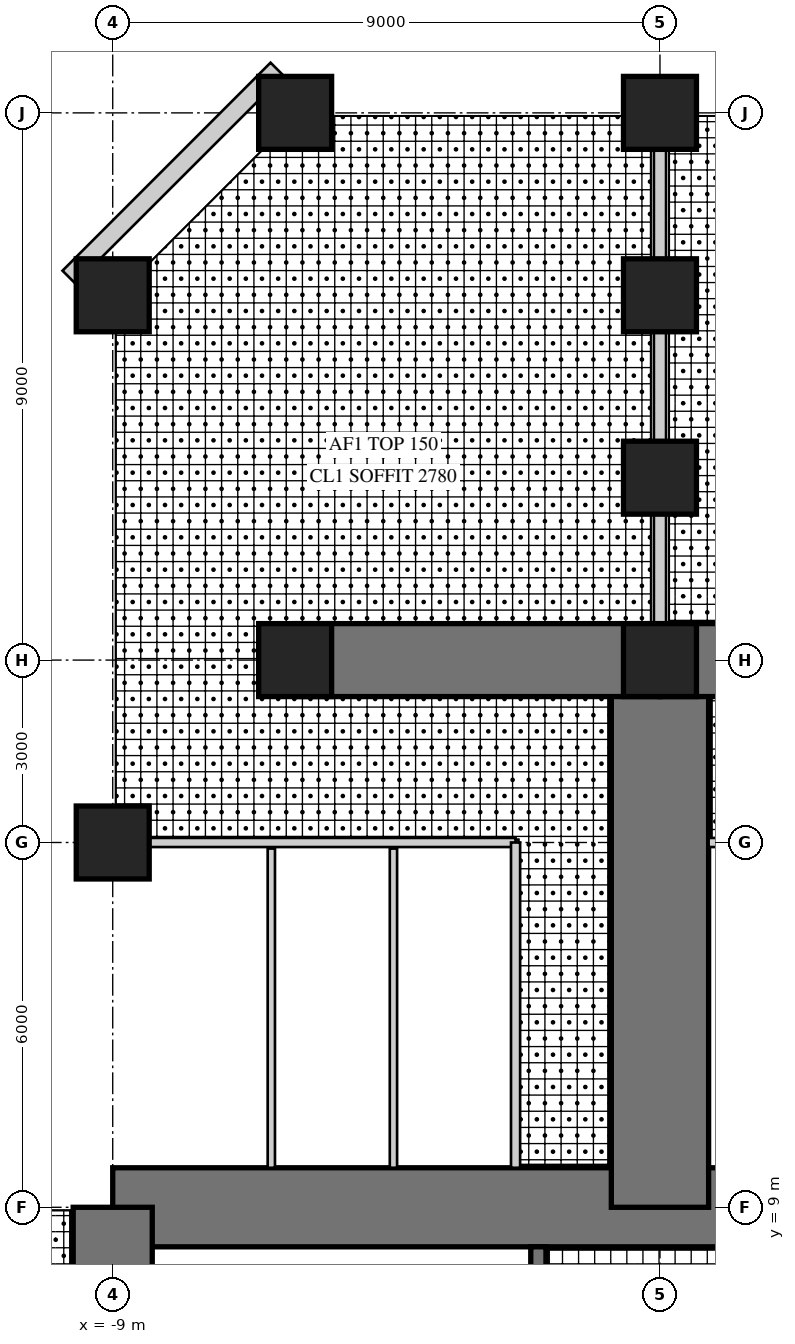
"""IFC4 building model, lengths in metres.
Left out: names, types, materials, properties, quantities, classifications, styles, units other than length and angle.
Written with IfcOpenShell. Run it as: python <this file> out.ifc"""

import sys

from ifc_helpers import new_model, si_unit, direction, frame, frame_2d, origin, origin_2d, place, context, subcontext, project, spatial, rectangle, hollow_rectangle, extrude, element, fill, save


model = new_model("IFC4")
c1 = context("Model", 3, precision=1e-05, world=origin(), true_north=direction((0.0, 1.0)))
c2 = subcontext(c1, "Body", "Model", "MODEL_VIEW")
j1 = project(units=[si_unit("LENGTHUNIT", "METRE"), si_unit("PLANEANGLEUNIT", "RADIAN")], contexts=[c1])
p1 = place(None, origin())
s1 = spatial("IfcSite", under=j1, at=p1, CompositionType="ELEMENT")
p2 = place(p1, origin())
s2 = spatial("IfcBuilding", under=s1, at=p2, CompositionType="ELEMENT")
p3 = place(p2, frame((0.0, 0.0, 71.5)))
s3 = spatial("IfcBuildingStorey", under=s2, at=p3, CompositionType="ELEMENT", Elevation=71.5)
p4 = place(p3, frame((9.0, 9.0, 0.0), z_axis=(0.0, 0.0, 1.0), x_axis=(-1.0, 0.0, 0.0)))
e1 = element("IfcWall", 1, at=p4, inside=s3, PredefinedType="SHEAR", context=c2, shape_type="SweptSolid", body=[
    extrude(rectangle(XDim=18.0, YDim=1.3, at=frame_2d((9.0, 0.0))), origin(), (0.0, 0.0, 1.0), 4.0),
])
p5 = place(p4, frame((9.8, 0.0, 0.0)))
e2 = element("IfcOpeningElement", 2, at=p5, cuts=e1, PredefinedType="OPENING", context=c2, shape_type="SweptSolid", body=[
    extrude(rectangle(XDim=1.0, YDim=2.4, at=frame_2d((0.5, 1.2))), frame((0.0, 0.66, 0.0), z_axis=(0.0, -1.0, 0.0), x_axis=(1.0, 0.0, 0.0)), (0.0, 0.0, 1.0), 1.32),
])
p6 = place(p3, frame((-9.0, 9.0, 0.0), z_axis=(0.0, 0.0, 1.0), x_axis=(0.0, -1.0, 0.0)))
e3 = element("IfcWall", 3, at=p6, inside=s3, PredefinedType="SHEAR", context=c2, shape_type="SweptSolid", body=[
    extrude(rectangle(XDim=18.0, YDim=1.3, at=frame_2d((9.0, 0.0))), origin(), (0.0, 0.0, 1.0), 4.0),
])
p7 = place(p6, frame((9.8, 0.0, 0.0)))
e4 = element("IfcOpeningElement", 4, at=p7, cuts=e3, PredefinedType="OPENING", context=c2, shape_type="SweptSolid", body=[
    extrude(rectangle(XDim=1.0, YDim=2.4, at=frame_2d((0.5, 1.2))), frame((0.0, 0.66, 0.0), z_axis=(0.0, -1.0, 0.0), x_axis=(1.0, 0.0, 0.0)), (0.0, 0.0, 1.0), 1.32),
])
p8 = place(p3, frame((-2.0, 1.675, 0.0), z_axis=(0.0, 0.0, 1.0), x_axis=(0.0, 1.0, 0.0)))
e5 = element("IfcWall", 5, at=p8, inside=s3, PredefinedType="SHEAR", context=c2, shape_type="SweptSolid", body=[
    extrude(rectangle(XDim=6.675, YDim=0.25, at=frame_2d((3.337, 0.0))), origin(), (0.0, 0.0, 1.0), 4.0),
])
p9 = place(p8, frame((0.725, 0.0, 0.0)))
e6 = element("IfcOpeningElement", 6, at=p9, cuts=e5, PredefinedType="OPENING", context=c2, shape_type="SweptSolid", body=[
    extrude(rectangle(XDim=1.0, YDim=2.1, at=frame_2d((0.5, 1.05))), frame((0.0, 0.135, 0.0), z_axis=(0.0, -1.0, 0.0), x_axis=(1.0, 0.0, 0.0)), (0.0, 0.0, 1.0), 0.27),
])
p10 = place(p3, frame((0.0, 9.0, 0.0), z_axis=(0.0, 0.0, 1.0), x_axis=(0.0, 1.0, 0.0)))
e7 = element("IfcWall", 7, at=p10, inside=s3, PredefinedType="SHEAR", context=c2, shape_type="SweptSolid", body=[
    extrude(rectangle(XDim=9.0, YDim=1.6, at=frame_2d((4.5, 0.0))), origin(), (0.0, 0.0, 1.0), 4.0),
])
for number, where, z_axis, x_axis in (
    (8, (0.0, 18.0, 0.0), (0.0, 0.0, 1.0), (-1.0, 0.0, 0.0)),
    (9, (0.0, 18.0, 0.0), (0.0, 0.0, 1.0), (1.0, 0.0, 0.0)),
):
    element("IfcWall", number, at=place(p3, frame(where, z_axis=z_axis, x_axis=x_axis)), inside=s3, PredefinedType="SHEAR", context=c2, shape_type="SweptSolid", body=[
        extrude(rectangle(XDim=6.0, YDim=1.2, at=frame_2d((3.0, 0.0))), origin(), (0.0, 0.0, 1.0), 4.0),
    ])
for number, where, z_axis, x_axis in (
    (10, (-9.0, 15.0, 0.0), (0.0, 0.0, 1.0), (1.0, 0.0, 0.0)),
    (11, (-9.0, 24.0, 0.0), (0.0, 0.0, 1.0), (1.0, 0.0, 0.0)),
    (12, (0.0, 27.0, 0.0), (0.0, 0.0, 1.0), (1.0, 0.0, 0.0)),
    (13, (-6.0, 27.0, 0.0), (0.0, 0.0, 1.0), (1.0, 0.0, 0.0)),
    (14, (0.0, 18.0, 0.0), (0.0, 0.0, 1.0), (1.0, 0.0, 0.0)),
    (15, (-6.0, 18.0, 0.0), (0.0, 0.0, 1.0), (1.0, 0.0, 0.0)),
    (16, (0.0, 21.0, 0.0), (0.0, 0.0, 1.0), (1.0, 0.0, 0.0)),
    (17, (0.0, 24.0, 0.0), (0.0, 0.0, 1.0), (1.0, 0.0, 0.0)),
):
    element("IfcColumn", number, at=place(p3, frame(where, z_axis=z_axis, x_axis=x_axis)), inside=s3, PredefinedType="COLUMN", context=c2, shape_type="SweptSolid", body=[
        extrude(rectangle(XDim=1.2, YDim=1.2, at=origin_2d()), origin(), (0.0, 0.0, 1.0), 4.0),
    ])
p11 = place(p3, frame((-6.298, 27.72, 0.0), z_axis=(0.0, 0.0, 1.0), x_axis=(-0.707106781187, -0.707106781187, 0.0)))
e18 = element("IfcWall", 18, at=p11, inside=s3, PredefinedType="SOLIDWALL", context=c2, shape_type="SweptSolid", body=[
    extrude(rectangle(XDim=4.839, YDim=0.3, at=frame_2d((2.419, 0.0))), origin(), (0.0, 0.0, 1.0), 3.8),
])
p12 = place(p11, frame((1.969, 0.0, 0.3)))
e19 = element("IfcOpeningElement", 19, at=p12, cuts=e18, PredefinedType="OPENING", context=c2, shape_type="SweptSolid", body=[
    extrude(rectangle(XDim=0.9, YDim=2.4, at=frame_2d((0.45, 1.2))), frame((0.0, 0.16, 0.0), z_axis=(0.0, -1.0, 0.0), x_axis=(1.0, 0.0, 0.0)), (0.0, 0.0, 1.0), 0.32),
])
p13 = place(p3, frame((-2.375, 15.0, 0.0), z_axis=(0.0, 0.0, 1.0), x_axis=(-1.0, 0.0, 0.0)))
e20 = element("IfcWall", 20, at=p13, inside=s3, PredefinedType="PARTITIONING", context=c2, shape_type="SweptSolid", body=[
    extrude(rectangle(XDim=6.025, YDim=0.15, at=frame_2d((3.012, 0.0))), origin(), (0.0, 0.0, 1.0), 2.95),
])
p14 = place(p13, frame((0.504, 0.0, 0.0)))
e21 = element("IfcOpeningElement", 21, at=p14, cuts=e20, PredefinedType="OPENING", context=c2, shape_type="SweptSolid", body=[
    extrude(rectangle(XDim=1.0, YDim=2.1, at=frame_2d((0.5, 1.05))), frame((0.0, 0.085, 0.0), z_axis=(0.0, -1.0, 0.0), x_axis=(1.0, 0.0, 0.0)), (0.0, 0.0, 1.0), 0.17),
])
p15 = place(p13, frame((2.512, 0.0, 0.0)))
e22 = element("IfcOpeningElement", 22, at=p15, cuts=e20, PredefinedType="OPENING", context=c2, shape_type="SweptSolid", body=[
    extrude(rectangle(XDim=1.0, YDim=2.1, at=frame_2d((0.5, 1.05))), frame((0.0, 0.085, 0.0), z_axis=(0.0, -1.0, 0.0), x_axis=(1.0, 0.0, 0.0)), (0.0, 0.0, 1.0), 0.17),
])
p16 = place(p13, frame((4.521, 0.0, 0.0)))
e23 = element("IfcOpeningElement", 23, at=p16, cuts=e20, PredefinedType="OPENING", context=c2, shape_type="SweptSolid", body=[
    extrude(rectangle(XDim=1.0, YDim=2.1, at=frame_2d((0.5, 1.05))), frame((0.0, 0.085, 0.0), z_axis=(0.0, -1.0, 0.0), x_axis=(1.0, 0.0, 0.0)), (0.0, 0.0, 1.0), 0.17),
])
p17 = place(p3, frame((-2.375, 9.65, 0.0), z_axis=(0.0, 0.0, 1.0), x_axis=(0.0, 1.0, 0.0)))
e24 = element("IfcWall", 24, at=p17, inside=s3, PredefinedType="PARTITIONING", context=c2, shape_type="SweptSolid", body=[
    extrude(rectangle(XDim=5.35, YDim=0.15, at=frame_2d((2.675, 0.0))), origin(), (0.0, 0.0, 1.0), 3.8),
])
for number, where, z_axis, x_axis in (
    (25, (-4.383, 9.65, 0.0), (0.0, 0.0, 1.0), (0.0, 1.0, 0.0)),
    (26, (-6.392, 9.65, 0.0), (0.0, 0.0, 1.0), (0.0, 1.0, 0.0)),
):
    element("IfcWall", number, at=place(p3, frame(where, z_axis=z_axis, x_axis=x_axis)), inside=s3, PredefinedType="PLUMBINGWALL", context=c2, shape_type="SweptSolid", body=[
        extrude(rectangle(XDim=5.25, YDim=0.12, at=frame_2d((2.625, 0.0))), origin(), (0.0, 0.0, 1.0), 3.8),
    ])
p18 = place(p3, frame((8.4, 15.0, 0.0), z_axis=(0.0, 0.0, 1.0), x_axis=(-1.0, 0.0, 0.0)))
e27 = element("IfcWall", 27, at=p18, inside=s3, PredefinedType="PARTITIONING", context=c2, shape_type="SweptSolid", body=[
    extrude(rectangle(XDim=7.6, YDim=0.15, at=frame_2d((3.8, 0.0))), origin(), (0.0, 0.0, 1.0), 2.95),
])
p19 = place(p18, frame((0.75, 0.0, 0.0)))
e28 = element("IfcOpeningElement", 28, at=p19, cuts=e27, PredefinedType="OPENING", context=c2, shape_type="SweptSolid", body=[
    extrude(rectangle(XDim=1.0, YDim=2.1, at=frame_2d((0.5, 1.05))), frame((0.0, 0.085, 0.0), z_axis=(0.0, -1.0, 0.0), x_axis=(1.0, 0.0, 0.0)), (0.0, 0.0, 1.0), 0.17),
])
p20 = place(p18, frame((3.25, 0.0, 0.0)))
e29 = element("IfcOpeningElement", 29, at=p20, cuts=e27, PredefinedType="OPENING", context=c2, shape_type="SweptSolid", body=[
    extrude(rectangle(XDim=1.0, YDim=2.1, at=frame_2d((0.5, 1.05))), frame((0.0, 0.085, 0.0), z_axis=(0.0, -1.0, 0.0), x_axis=(1.0, 0.0, 0.0)), (0.0, 0.0, 1.0), 0.17),
])
p21 = place(p18, frame((5.8, 0.0, 0.0)))
e30 = element("IfcOpeningElement", 30, at=p21, cuts=e27, PredefinedType="OPENING", context=c2, shape_type="SweptSolid", body=[
    extrude(rectangle(XDim=1.0, YDim=2.1, at=frame_2d((0.5, 1.05))), frame((0.0, 0.085, 0.0), z_axis=(0.0, -1.0, 0.0), x_axis=(1.0, 0.0, 0.0)), (0.0, 0.0, 1.0), 0.17),
])
p22 = place(p3, frame((0.0, 18.0, 0.0), z_axis=(0.0, 0.0, 1.0), x_axis=(0.0, 1.0, 0.0)))
e31 = element("IfcWall", 31, at=p22, inside=s3, PredefinedType="SOLIDWALL", context=c2, shape_type="SweptSolid", body=[
    extrude(rectangle(XDim=3.0, YDim=0.2, at=frame_2d((1.5, 0.0))), origin(), (0.0, 0.0, 1.0), 3.8),
])
p23 = place(p22, frame((0.9, 0.0, 0.0)))
e32 = element("IfcOpeningElement", 32, at=p23, cuts=e31, PredefinedType="OPENING", context=c2, shape_type="SweptSolid", body=[
    extrude(rectangle(XDim=1.0, YDim=2.2, at=frame_2d((0.5, 1.1))), frame((0.0, 0.11, 0.0), z_axis=(0.0, -1.0, 0.0), x_axis=(1.0, 0.0, 0.0)), (0.0, 0.0, 1.0), 0.22),
])
p24 = place(p3, frame((0.0, 21.0, 0.0), z_axis=(0.0, 0.0, 1.0), x_axis=(0.0, 1.0, 0.0)))
e33 = element("IfcWall", 33, at=p24, inside=s3, PredefinedType="SOLIDWALL", context=c2, shape_type="SweptSolid", body=[
    extrude(rectangle(XDim=6.0, YDim=0.2, at=frame_2d((3.0, 0.0))), origin(), (0.0, 0.0, 1.0), 2.9),
])
p25 = place(p12, origin())
e34 = element("IfcWindow", 34, at=p25, inside=s3, PartitioningType="SINGLE_PANEL", PredefinedType="WINDOW", context=c2, shape_type="SweptSolid", body=[
    extrude(hollow_rectangle(XDim=0.9, YDim=2.4, WallThickness=0.06, at=frame_2d((0.45, 1.2))), frame((0.0, 0.03, 0.0), z_axis=(0.0, -1.0, 0.0), x_axis=(1.0, 0.0, 0.0)), (0.0, 0.0, 1.0), 0.06),
    extrude(rectangle(XDim=0.779, YDim=2.279, at=frame_2d((0.45, 1.2))), frame((0.0, 0.03, 0.0), z_axis=(0.0, -1.0, 0.0), x_axis=(1.0, 0.0, 0.0)), (0.0, 0.0, 1.0), 0.06),
])
fill(e19, e34)
p26 = place(p14, origin())
e35 = element("IfcDoor", 35, at=p26, inside=s3, OperationType="SINGLE_SWING_LEFT", PredefinedType="DOOR", context=c2, shape_type="SweptSolid", body=[
    extrude(rectangle(XDim=1.0, YDim=2.1, at=frame_2d((0.5, 1.05))), frame((0.0, 0.025, 0.0), z_axis=(0.0, -1.0, 0.0), x_axis=(1.0, 0.0, 0.0)), (0.0, 0.0, 1.0), 0.05),
])
fill(e21, e35)
p27 = place(p15, origin())
e36 = element("IfcDoor", 36, at=p27, inside=s3, OperationType="SINGLE_SWING_LEFT", PredefinedType="DOOR", context=c2, shape_type="SweptSolid", body=[
    extrude(rectangle(XDim=1.0, YDim=2.1, at=frame_2d((0.5, 1.05))), frame((0.0, 0.025, 0.0), z_axis=(0.0, -1.0, 0.0), x_axis=(1.0, 0.0, 0.0)), (0.0, 0.0, 1.0), 0.05),
])
fill(e22, e36)
p28 = place(p16, origin())
e37 = element("IfcDoor", 37, at=p28, inside=s3, OperationType="SINGLE_SWING_LEFT", PredefinedType="DOOR", context=c2, shape_type="SweptSolid", body=[
    extrude(rectangle(XDim=1.0, YDim=2.1, at=frame_2d((0.5, 1.05))), frame((0.0, 0.025, 0.0), z_axis=(0.0, -1.0, 0.0), x_axis=(1.0, 0.0, 0.0)), (0.0, 0.0, 1.0), 0.05),
])
fill(e23, e37)
p29 = place(p23, frame((1.0, 0.0, 0.0), z_axis=(0.0, 0.0, 1.0), x_axis=(-1.0, 0.0, 0.0)))
e38 = element("IfcDoor", 38, at=p29, inside=s3, OperationType="SINGLE_SWING_RIGHT", PredefinedType="DOOR", context=c2, shape_type="SweptSolid", body=[
    extrude(rectangle(XDim=1.0, YDim=2.2, at=frame_2d((0.5, 1.1))), frame((0.0, 0.025, 0.0), z_axis=(0.0, -1.0, 0.0), x_axis=(1.0, 0.0, 0.0)), (0.0, 0.0, 1.0), 0.05),
])
fill(e32, e38)
p30 = place(p5, frame((1.0, 0.0, 0.0), z_axis=(0.0, 0.0, 1.0), x_axis=(-1.0, 0.0, 0.0)))
e39 = element("IfcDoor", 39, at=p30, inside=s3, OperationType="SINGLE_SWING_RIGHT", PredefinedType="DOOR", context=c2, shape_type="SweptSolid", body=[
    extrude(rectangle(XDim=1.0, YDim=2.4, at=frame_2d((0.5, 1.2))), frame((0.0, -0.005, 0.0), z_axis=(0.0, -1.0, 0.0), x_axis=(1.0, 0.0, 0.0)), (0.0, 0.0, 1.0), 0.05),
])
fill(e2, e39)
save(model, sys.argv[1])
